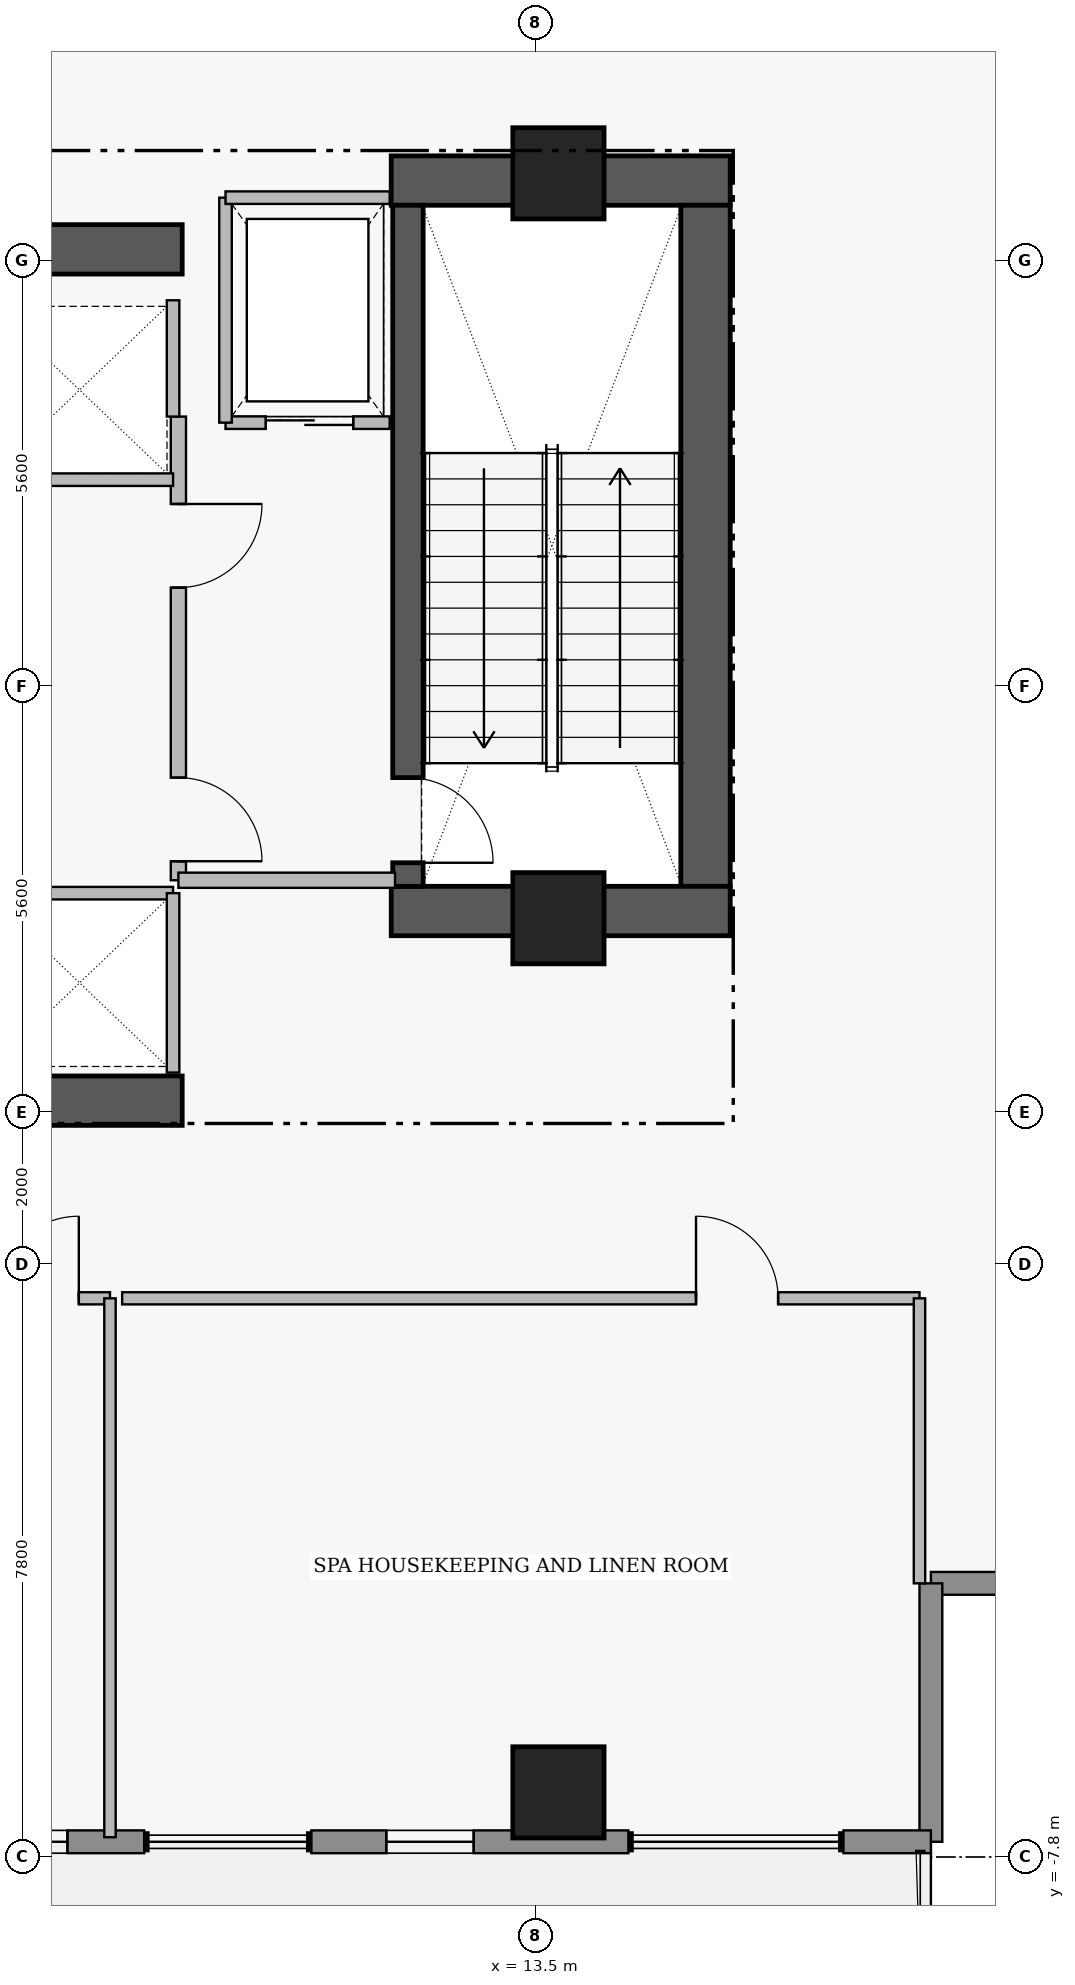
"""IFC4 building model, lengths in metres.
Left out: names, types, materials, properties, quantities, classifications, styles, units other than length and angle.
Written with IfcOpenShell. Run it as: python <this file> out.ifc"""

import sys

from ifc_helpers import new_model, si_unit, direction, frame, frame_2d, origin, origin_2d, place, context, subcontext, project, spatial, rectangle, extrude, element, fill, save


model = new_model("IFC4")
c1 = context("Model", 3, precision=1e-05, world=origin(), true_north=direction((0.0, 1.0)))
c2 = subcontext(c1, "Body", "Model", "MODEL_VIEW")
j1 = project(units=[si_unit("LENGTHUNIT", "METRE"), si_unit("PLANEANGLEUNIT", "RADIAN")], contexts=[c1])
p1 = place(None, origin())
s1 = spatial("IfcSite", under=j1, at=p1, CompositionType="ELEMENT")
p2 = place(p1, origin())
s2 = spatial("IfcBuilding", under=s1, at=p2, CompositionType="ELEMENT")
p3 = place(p2, frame((0.0, 0.0, 172.8)))
s3 = spatial("IfcBuildingStorey", under=s2, at=p3, CompositionType="ELEMENT", Elevation=172.8)
p4 = place(p3, frame((11.6, 14.255, 0.0), z_axis=(0.0, 0.0, 1.0), x_axis=(1.0, 0.0, 0.0)))
e1 = element("IfcWall", 1, at=p4, inside=s3, PredefinedType="SHEAR", context=c2, shape_type="SweptSolid", body=[
    extrude(rectangle(XDim=4.46, YDim=0.65, at=frame_2d((2.23, 0.0))), origin(), (0.0, 0.0, 1.0), 4.41),
])
p5 = place(p3, frame((15.735, 4.97, 0.0), z_axis=(0.0, 0.0, 1.0), x_axis=(0.0, 1.0, 0.0)))
e2 = element("IfcWall", 2, at=p5, inside=s3, PredefinedType="SHEAR", context=c2, shape_type="SweptSolid", body=[
    extrude(rectangle(XDim=8.96, YDim=0.65, at=frame_2d((4.48, 0.0))), origin(), (0.0, 0.0, 1.0), 4.41),
])
p6 = place(p3, frame((11.6, 4.645, 0.0), z_axis=(0.0, 0.0, 1.0), x_axis=(1.0, 0.0, 0.0)))
e3 = element("IfcWall", 3, at=p6, inside=s3, PredefinedType="SHEAR", context=c2, shape_type="SweptSolid", body=[
    extrude(rectangle(XDim=4.46, YDim=0.65, at=frame_2d((2.23, 0.0))), origin(), (0.0, 0.0, 1.0), 4.41),
])
for number, where, z_axis, x_axis in (
    (4, (1.25, 2.15, 0.0), (0.0, 0.0, 1.0), (1.0, 0.0, 0.0)),
    (5, (1.25, 13.35, 0.0), (0.0, 0.0, 1.0), (1.0, 0.0, 0.0)),
):
    element("IfcWall", number, at=place(p3, frame(where, z_axis=z_axis, x_axis=x_axis)), inside=s3, PredefinedType="SHEAR", context=c2, shape_type="SweptSolid", body=[
        extrude(rectangle(XDim=7.6, YDim=0.65, at=frame_2d((3.8, 0.0))), origin(), (0.0, 0.0, 1.0), 4.38),
    ])
p7 = place(p3, frame((11.82, 13.93, 0.0), z_axis=(0.0, 0.0, 1.0), x_axis=(0.0, -1.0, 0.0)))
e6 = element("IfcWall", 6, at=p7, inside=s3, PredefinedType="SHEAR", context=c2, shape_type="SweptSolid", body=[
    extrude(rectangle(XDim=8.96, YDim=0.4, at=frame_2d((4.48, 0.0))), origin(), (0.0, 0.0, 1.0), 4.41),
])
p8 = place(p7, frame((7.53, 0.0, 0.0)))
e7 = element("IfcOpeningElement", 7, at=p8, cuts=e6, PredefinedType="OPENING", context=c2, shape_type="SweptSolid", body=[
    extrude(rectangle(XDim=1.12, YDim=2.22, at=frame_2d((0.56, 1.11))), frame((0.0, 0.21, 0.0), z_axis=(0.0, -1.0, 0.0), x_axis=(1.0, 0.0, 0.0)), (0.0, 0.0, 1.0), 0.42),
])
for number, where, z_axis, x_axis in (
    (8, (13.8, 14.35, 0.0), (0.0, 0.0, 1.0), (1.0, 0.0, 0.0)),
    (9, (13.8, 4.55, 0.0), (0.0, 0.0, 1.0), (1.0, 0.0, 0.0)),
    (10, (13.8, -6.95, 0.0), (0.0, 0.0, 1.0), (1.0, 0.0, 0.0)),
):
    element("IfcColumn", number, at=place(p3, frame(where, z_axis=z_axis, x_axis=x_axis)), inside=s3, PredefinedType="COLUMN", context=c2, shape_type="SweptSolid", body=[
        extrude(rectangle(XDim=1.2, YDim=1.2, at=origin_2d()), origin(), (0.0, 0.0, 1.0), 4.6),
    ])
for number, where, z_axis, x_axis in (
    (11, (22.1, -4.2, 0.0), (0.0, 0.0, 1.0), (-1.0, 0.0, 0.0)),
    (12, (18.7, -4.2, 0.0), (0.0, 0.0, 1.0), (0.0, -1.0, 0.0)),
):
    element("IfcWall", number, at=place(p3, frame(where, z_axis=z_axis, x_axis=x_axis)), inside=s3, PredefinedType="STANDARD", context=c2, shape_type="SweptSolid", body=[
        extrude(rectangle(XDim=3.4, YDim=0.3, at=frame_2d((1.7, 0.0))), origin(), (0.0, 0.0, 1.0), 4.38),
    ])
p9 = place(p3, frame((18.7, -7.6, 0.0), z_axis=(0.0, 0.0, 1.0), x_axis=(-1.0, 0.0, 0.0)))
e13 = element("IfcWall", 13, at=p9, inside=s3, PredefinedType="STANDARD", context=c2, shape_type="SweptSolid", body=[
    extrude(rectangle(XDim=1.15, YDim=0.3, at=frame_2d((0.575, 0.0))), origin(), (0.0, 0.0, 1.0), 4.38),
])
p10 = place(p3, frame((14.72, -7.6, 0.0), z_axis=(0.0, 0.0, 1.0), x_axis=(-1.0, 0.0, 0.0)))
e14 = element("IfcWall", 14, at=p10, inside=s3, PredefinedType="STANDARD", context=c2, shape_type="SweptSolid", body=[
    extrude(rectangle(XDim=4.17, YDim=0.3, at=frame_2d((2.085, 0.0))), origin(), (0.0, 0.0, 1.0), 4.38),
])
p11 = place(p10, frame((2.035, 0.0, 0.95)))
e15 = element("IfcOpeningElement", 15, at=p11, cuts=e14, PredefinedType="OPENING", context=c2, shape_type="SweptSolid", body=[
    extrude(rectangle(XDim=1.15, YDim=1.55, at=frame_2d((0.575, 0.775))), frame((0.0, 0.16, 0.0), z_axis=(0.0, -1.0, 0.0), x_axis=(1.0, 0.0, 0.0)), (0.0, 0.0, 1.0), 0.32),
])
p12 = place(p3, frame((8.35, -7.6, 0.0), z_axis=(0.0, 0.0, 1.0), x_axis=(-1.0, 0.0, 0.0)))
e16 = element("IfcWall", 16, at=p12, inside=s3, PredefinedType="STANDARD", context=c2, shape_type="SweptSolid", body=[
    extrude(rectangle(XDim=4.67, YDim=0.3, at=frame_2d((2.335, 0.0))), origin(), (0.0, 0.0, 1.0), 4.38),
])
p13 = place(p12, frame((1.01, 0.0, 0.85)))
e17 = element("IfcOpeningElement", 17, at=p13, cuts=e16, PredefinedType="OPENING", context=c2, shape_type="SweptSolid", body=[
    extrude(rectangle(XDim=1.6, YDim=1.8, at=frame_2d((0.8, 0.9))), frame((0.0, 0.16, 0.0), z_axis=(0.0, -1.0, 0.0), x_axis=(1.0, 0.0, 0.0)), (0.0, 0.0, 1.0), 0.32),
])
p14 = place(p3, frame((8.8, 11.15, 0.0), z_axis=(0.0, 0.0, 1.0), x_axis=(0.0, -1.0, 0.0)))
e18 = element("IfcWall", 18, at=p14, inside=s3, PredefinedType="PARTITIONING", context=c2, shape_type="SweptSolid", body=[
    extrude(rectangle(XDim=6.1, YDim=0.2, at=frame_2d((3.05, 0.0))), origin(), (0.0, 0.0, 1.0), 4.38),
])
p15 = place(p14, frame((1.15, 0.0, 0.0)))
e19 = element("IfcOpeningElement", 19, at=p15, cuts=e18, PredefinedType="OPENING", context=c2, shape_type="SweptSolid", body=[
    extrude(rectangle(XDim=1.1, YDim=2.2, at=frame_2d((0.55, 1.1))), frame((0.0, 0.11, 0.0), z_axis=(0.0, -1.0, 0.0), x_axis=(1.0, 0.0, 0.0)), (0.0, 0.0, 1.0), 0.22),
])
p16 = place(p14, frame((4.75, 0.0, 0.0)))
e20 = element("IfcOpeningElement", 20, at=p16, cuts=e18, PredefinedType="OPENING", context=c2, shape_type="SweptSolid", body=[
    extrude(rectangle(XDim=1.1, YDim=2.2, at=frame_2d((0.55, 1.1))), frame((0.0, 0.11, 0.0), z_axis=(0.0, -1.0, 0.0), x_axis=(1.0, 0.0, 0.0)), (0.0, 0.0, 1.0), 0.22),
])
p17 = place(p3, frame((9.42, 11.07, 0.0), z_axis=(0.0, 0.0, 1.0), x_axis=(1.0, 0.0, 0.0)))
e21 = element("IfcWall", 21, at=p17, inside=s3, PredefinedType="PARTITIONING", context=c2, shape_type="SweptSolid", body=[
    extrude(rectangle(XDim=2.16, YDim=0.165, at=frame_2d((1.08, 0.0))), origin(), (0.0, 0.0, 1.0), 4.38),
])
p18 = place(p17, frame((0.53, 0.0, 0.0)))
e22 = element("IfcOpeningElement", 22, at=p18, cuts=e21, PredefinedType="OPENING", context=c2, shape_type="SweptSolid", body=[
    extrude(rectangle(XDim=1.15, YDim=2.25, at=frame_2d((0.575, 1.125))), frame((0.0, 0.093, 0.0), z_axis=(0.0, -1.0, 0.0), x_axis=(1.0, 0.0, 0.0)), (0.0, 0.0, 1.0), 0.185),
])
p19 = place(p3, frame((-0.24, -0.45, 0.0), z_axis=(0.0, 0.0, 1.0), x_axis=(1.0, 0.0, 0.0)))
e23 = element("IfcWall", 23, at=p19, inside=s3, PredefinedType="PARTITIONING", context=c2, shape_type="SweptSolid", body=[
    extrude(rectangle(XDim=8.14, YDim=0.16, at=frame_2d((4.07, 0.0))), origin(), (0.0, 0.0, 1.0), 4.38),
])
p20 = place(p19, frame((6.65, 0.0, 0.0)))
e24 = element("IfcOpeningElement", 24, at=p20, cuts=e23, PredefinedType="OPENING", context=c2, shape_type="SweptSolid", body=[
    extrude(rectangle(XDim=1.08, YDim=2.18, at=frame_2d((0.54, 1.09))), frame((0.0, 0.09, 0.0), z_axis=(0.0, -1.0, 0.0), x_axis=(1.0, 0.0, 0.0)), (0.0, 0.0, 1.0), 0.18),
])
p21 = place(p3, frame((8.06, -0.45, 0.0), z_axis=(0.0, 0.0, 1.0), x_axis=(1.0, 0.0, 0.0)))
e25 = element("IfcWall", 25, at=p21, inside=s3, PredefinedType="PARTITIONING", context=c2, shape_type="SweptSolid", body=[
    extrude(rectangle(XDim=10.49, YDim=0.16, at=frame_2d((5.245, 0.0))), origin(), (0.0, 0.0, 1.0), 4.38),
])
p22 = place(p21, frame((7.55, 0.0, 0.0)))
e26 = element("IfcOpeningElement", 26, at=p22, cuts=e25, PredefinedType="OPENING", context=c2, shape_type="SweptSolid", body=[
    extrude(rectangle(XDim=1.08, YDim=2.18, at=frame_2d((0.54, 1.09))), frame((0.0, 0.09, 0.0), z_axis=(0.0, -1.0, 0.0), x_axis=(1.0, 0.0, 0.0)), (0.0, 0.0, 1.0), 0.18),
])
p23 = place(p3, frame((8.8, 5.05, 0.0), z_axis=(0.0, 0.0, 1.0), x_axis=(1.0, 0.0, 0.0)))
e27 = element("IfcWall", 27, at=p23, inside=s3, PredefinedType="PARTITIONING", context=c2, shape_type="SweptSolid", body=[
    extrude(rectangle(XDim=2.85, YDim=0.2, at=frame_2d((1.425, 0.0))), origin(), (0.0, 0.0, 1.0), 4.38),
])
p24 = place(p3, frame((9.42, 11.07, 0.0), z_axis=(0.0, 0.0, 1.0), x_axis=(0.0, 1.0, 0.0)))
e28 = element("IfcWall", 28, at=p24, inside=s3, PredefinedType="PARTITIONING", context=c2, shape_type="SweptSolid", body=[
    extrude(rectangle(XDim=2.96, YDim=0.165, at=frame_2d((1.48, 0.0))), origin(), (0.0, 0.0, 1.0), 4.38),
])
p25 = place(p3, frame((9.42, 14.03, 0.0), z_axis=(0.0, 0.0, 1.0), x_axis=(1.0, 0.0, 0.0)))
e29 = element("IfcWall", 29, at=p25, inside=s3, PredefinedType="PARTITIONING", context=c2, shape_type="SweptSolid", body=[
    extrude(rectangle(XDim=2.16, YDim=0.165, at=frame_2d((1.08, 0.0))), origin(), (0.0, 0.0, 1.0), 4.38),
])
p26 = place(p3, frame((6.25, 4.88, 0.0), z_axis=(0.0, 0.0, 1.0), x_axis=(1.0, 0.0, 0.0)))
e30 = element("IfcWall", 30, at=p26, inside=s3, PredefinedType="PARTITIONING", context=c2, shape_type="SweptSolid", body=[
    extrude(rectangle(XDim=2.48, YDim=0.165, at=frame_2d((1.24, 0.0))), origin(), (0.0, 0.0, 1.0), 4.38),
])
p27 = place(p3, frame((8.73, 2.52, 0.0), z_axis=(0.0, 0.0, 1.0), x_axis=(0.0, 1.0, 0.0)))
e31 = element("IfcWall", 31, at=p27, inside=s3, PredefinedType="PARTITIONING", context=c2, shape_type="SweptSolid", body=[
    extrude(rectangle(XDim=2.36, YDim=0.165, at=frame_2d((1.18, 0.0))), origin(), (0.0, 0.0, 1.0), 4.38),
])
p28 = place(p3, frame((6.25, 10.32, 0.0), z_axis=(0.0, 0.0, 1.0), x_axis=(1.0, 0.0, 0.0)))
e32 = element("IfcWall", 32, at=p28, inside=s3, PredefinedType="PARTITIONING", context=c2, shape_type="SweptSolid", body=[
    extrude(rectangle(XDim=2.48, YDim=0.165, at=frame_2d((1.24, 0.0))), origin(), (0.0, 0.0, 1.0), 4.38),
])
p29 = place(p3, frame((8.73, 11.15, 0.0), z_axis=(0.0, 0.0, 1.0), x_axis=(0.0, 1.0, 0.0)))
e33 = element("IfcWall", 33, at=p29, inside=s3, PredefinedType="PARTITIONING", context=c2, shape_type="SweptSolid", body=[
    extrude(rectangle(XDim=1.53, YDim=0.165, at=frame_2d((0.765, 0.0))), origin(), (0.0, 0.0, 1.0), 4.38),
])
p30 = place(p3, frame((7.9, -7.54, 0.0), z_axis=(0.0, 0.0, 1.0), x_axis=(0.0, 1.0, 0.0)))
e34 = element("IfcWall", 34, at=p30, inside=s3, PredefinedType="PARTITIONING", context=c2, shape_type="SweptSolid", body=[
    extrude(rectangle(XDim=7.09, YDim=0.15, at=frame_2d((3.545, 0.0))), origin(), (0.0, 0.0, 1.0), 4.38),
])
p31 = place(p3, frame((18.55, -4.2, 0.0), z_axis=(0.0, 0.0, 1.0), x_axis=(0.0, 1.0, 0.0)))
e35 = element("IfcWall", 35, at=p31, inside=s3, PredefinedType="PARTITIONING", context=c2, shape_type="SweptSolid", body=[
    extrude(rectangle(XDim=3.75, YDim=0.15, at=frame_2d((1.875, 0.0))), origin(), (0.0, 0.0, 1.0), 4.38),
])
p32 = place(p11, origin())
e36 = element("IfcWindow", 36, at=p32, inside=s3, PartitioningType="SINGLE_PANEL", PredefinedType="WINDOW", context=c2, shape_type="SweptSolid", body=[
    extrude(rectangle(XDim=1.15, YDim=1.55, at=frame_2d((0.575, 0.775))), frame((0.0, 0.03, 0.0), z_axis=(0.0, -1.0, 0.0), x_axis=(1.0, 0.0, 0.0)), (0.0, 0.0, 1.0), 0.06),
])
fill(e15, e36)
p33 = place(p13, origin())
e37 = element("IfcWindow", 37, at=p33, inside=s3, PartitioningType="SINGLE_PANEL", PredefinedType="WINDOW", context=c2, shape_type="SweptSolid", body=[
    extrude(rectangle(XDim=1.6, YDim=1.8, at=frame_2d((0.8, 0.9))), frame((0.0, 0.03, 0.0), z_axis=(0.0, -1.0, 0.0), x_axis=(1.0, 0.0, 0.0)), (0.0, 0.0, 1.0), 0.06),
])
fill(e17, e37)
p34 = place(p8, origin())
e38 = element("IfcDoor", 38, at=p34, inside=s3, OperationType="SINGLE_SWING_RIGHT", PredefinedType="DOOR", context=c2, shape_type="SweptSolid", body=[
    extrude(rectangle(XDim=1.12, YDim=2.22, at=frame_2d((0.56, 1.11))), frame((0.0, 0.025, 0.0), z_axis=(0.0, -1.0, 0.0), x_axis=(1.0, 0.0, 0.0)), (0.0, 0.0, 1.0), 0.05),
])
fill(e7, e38)
p35 = place(p15, origin())
e39 = element("IfcDoor", 39, at=p35, inside=s3, OperationType="SINGLE_SWING_LEFT", PredefinedType="DOOR", context=c2, shape_type="SweptSolid", body=[
    extrude(rectangle(XDim=1.1, YDim=2.2, at=frame_2d((0.55, 1.1))), frame((0.0, 0.025, 0.0), z_axis=(0.0, -1.0, 0.0), x_axis=(1.0, 0.0, 0.0)), (0.0, 0.0, 1.0), 0.05),
])
fill(e19, e39)
p36 = place(p16, origin())
e40 = element("IfcDoor", 40, at=p36, inside=s3, OperationType="SINGLE_SWING_RIGHT", PredefinedType="DOOR", context=c2, shape_type="SweptSolid", body=[
    extrude(rectangle(XDim=1.1, YDim=2.2, at=frame_2d((0.55, 1.1))), frame((0.0, 0.025, 0.0), z_axis=(0.0, -1.0, 0.0), x_axis=(1.0, 0.0, 0.0)), (0.0, 0.0, 1.0), 0.05),
])
fill(e20, e40)
p37 = place(p18, origin())
e41 = element("IfcDoor", 41, at=p37, inside=s3, OperationType="SLIDING_TO_LEFT", PredefinedType="DOOR", context=c2, shape_type="SweptSolid", body=[
    extrude(rectangle(XDim=1.15, YDim=2.25, at=frame_2d((0.575, 1.125))), frame((0.0, 0.025, 0.0), z_axis=(0.0, -1.0, 0.0), x_axis=(1.0, 0.0, 0.0)), (0.0, 0.0, 1.0), 0.05),
])
fill(e22, e41)
p38 = place(p20, origin())
e42 = element("IfcDoor", 42, at=p38, inside=s3, OperationType="SINGLE_SWING_RIGHT", PredefinedType="DOOR", context=c2, shape_type="SweptSolid", body=[
    extrude(rectangle(XDim=1.08, YDim=2.18, at=frame_2d((0.54, 1.09))), frame((0.0, 0.025, 0.0), z_axis=(0.0, -1.0, 0.0), x_axis=(1.0, 0.0, 0.0)), (0.0, 0.0, 1.0), 0.05),
])
fill(e24, e42)
p39 = place(p22, origin())
e43 = element("IfcDoor", 43, at=p39, inside=s3, OperationType="SINGLE_SWING_LEFT", PredefinedType="DOOR", context=c2, shape_type="SweptSolid", body=[
    extrude(rectangle(XDim=1.08, YDim=2.18, at=frame_2d((0.54, 1.09))), frame((0.0, 0.025, 0.0), z_axis=(0.0, -1.0, 0.0), x_axis=(1.0, 0.0, 0.0)), (0.0, 0.0, 1.0), 0.05),
])
fill(e26, e43)
save(model, sys.argv[1])
